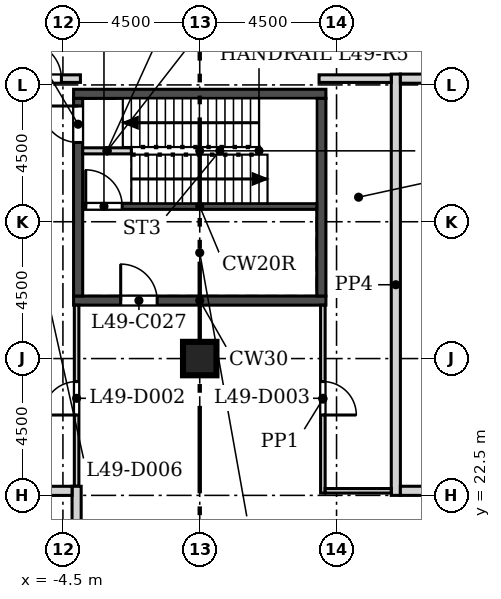
"""IFC4 building model, lengths in metres.
Left out: names, types, materials, properties, quantities, classifications, styles, units other than length and angle.
Written with IfcOpenShell. Run it as: python <this file> out.ifc"""

import sys

from ifc_helpers import new_model, si_unit, direction, frame, frame_2d, origin, origin_2d, place, context, subcontext, project, spatial, rectangle, extrude, element, fill, save


model = new_model("IFC4")
c1 = context("Model", 3, precision=1e-05, world=origin(), true_north=direction((0.0, 1.0)))
c2 = subcontext(c1, "Body", "Model", "MODEL_VIEW")
j1 = project(units=[si_unit("LENGTHUNIT", "METRE"), si_unit("PLANEANGLEUNIT", "RADIAN")], contexts=[c1])
p1 = place(None, origin())
s1 = spatial("IfcSite", under=j1, at=p1, CompositionType="ELEMENT")
p2 = place(p1, origin())
s2 = spatial("IfcBuilding", under=s1, at=p2, CompositionType="ELEMENT")
p3 = place(p2, frame((0.0, 0.0, 218.1)))
s3 = spatial("IfcBuildingStorey", under=s2, at=p3, CompositionType="ELEMENT", Elevation=218.1)
p4 = place(p3, frame((0.0, 27.0, 0.0), z_axis=(0.0, 0.0, 1.0), x_axis=(1.0, 0.0, 0.0)))
e1 = element("IfcColumn", 1, at=p4, inside=s3, PredefinedType="COLUMN", context=c2, shape_type="SweptSolid", body=[
    extrude(rectangle(XDim=1.1, YDim=1.1, at=origin_2d()), origin(), (0.0, 0.0, 1.0), 5.4),
])
p5 = place(p3, frame((27.139, 7.709, 0.0), z_axis=(0.0, 0.0, 1.0), x_axis=(-0.500000533701, 0.866025095652, 0.0)))
e2 = element("IfcWall", 2, at=p5, inside=s3, PredefinedType="SOLIDWALL", context=c2, shape_type="SweptSolid", body=[
    extrude(rectangle(XDim=45.573, YDim=0.34, at=frame_2d((22.787, 0.0))), origin(), (0.0, 0.0, 1.0), 5.0),
])
p6 = place(p5, frame((1.893, 0.0, 0.9)))
e3 = element("IfcOpeningElement", 3, at=p6, cuts=e2, PredefinedType="OPENING", context=c2, shape_type="SweptSolid", body=[
    extrude(rectangle(XDim=1.885, YDim=3.0, at=frame_2d((0.942, 1.5))), frame((0.0, 0.18, 0.0), z_axis=(0.0, -1.0, 0.0), x_axis=(1.0, 0.0, 0.0)), (0.0, 0.0, 1.0), 0.36),
])
p7 = place(p5, frame((4.893, 0.0, 0.9)))
e4 = element("IfcOpeningElement", 4, at=p7, cuts=e2, PredefinedType="OPENING", context=c2, shape_type="SweptSolid", body=[
    extrude(rectangle(XDim=1.885, YDim=3.0, at=frame_2d((0.942, 1.5))), frame((0.0, 0.18, 0.0), z_axis=(0.0, -1.0, 0.0), x_axis=(1.0, 0.0, 0.0)), (0.0, 0.0, 1.0), 0.36),
])
p8 = place(p5, frame((7.893, 0.0, 0.9)))
e5 = element("IfcOpeningElement", 5, at=p8, cuts=e2, PredefinedType="OPENING", context=c2, shape_type="SweptSolid", body=[
    extrude(rectangle(XDim=1.885, YDim=3.0, at=frame_2d((0.942, 1.5))), frame((0.0, 0.18, 0.0), z_axis=(0.0, -1.0, 0.0), x_axis=(1.0, 0.0, 0.0)), (0.0, 0.0, 1.0), 0.36),
])
p9 = place(p5, frame((10.893, 0.0, 0.9)))
e6 = element("IfcOpeningElement", 6, at=p9, cuts=e2, PredefinedType="OPENING", context=c2, shape_type="SweptSolid", body=[
    extrude(rectangle(XDim=1.885, YDim=3.0, at=frame_2d((0.942, 1.5))), frame((0.0, 0.18, 0.0), z_axis=(0.0, -1.0, 0.0), x_axis=(1.0, 0.0, 0.0)), (0.0, 0.0, 1.0), 0.36),
])
p10 = place(p5, frame((13.893, 0.0, 0.9)))
e7 = element("IfcOpeningElement", 7, at=p10, cuts=e2, PredefinedType="OPENING", context=c2, shape_type="SweptSolid", body=[
    extrude(rectangle(XDim=1.885, YDim=3.0, at=frame_2d((0.942, 1.5))), frame((0.0, 0.18, 0.0), z_axis=(0.0, -1.0, 0.0), x_axis=(1.0, 0.0, 0.0)), (0.0, 0.0, 1.0), 0.36),
])
p11 = place(p5, frame((16.893, 0.0, 0.9)))
e8 = element("IfcOpeningElement", 8, at=p11, cuts=e2, PredefinedType="OPENING", context=c2, shape_type="SweptSolid", body=[
    extrude(rectangle(XDim=1.885, YDim=3.0, at=frame_2d((0.942, 1.5))), frame((0.0, 0.18, 0.0), z_axis=(0.0, -1.0, 0.0), x_axis=(1.0, 0.0, 0.0)), (0.0, 0.0, 1.0), 0.36),
])
p12 = place(p5, frame((19.893, 0.0, 0.9)))
e9 = element("IfcOpeningElement", 9, at=p12, cuts=e2, PredefinedType="OPENING", context=c2, shape_type="SweptSolid", body=[
    extrude(rectangle(XDim=1.885, YDim=3.0, at=frame_2d((0.942, 1.5))), frame((0.0, 0.18, 0.0), z_axis=(0.0, -1.0, 0.0), x_axis=(1.0, 0.0, 0.0)), (0.0, 0.0, 1.0), 0.36),
])
p13 = place(p5, frame((22.893, 0.0, 0.9)))
e10 = element("IfcOpeningElement", 10, at=p13, cuts=e2, PredefinedType="OPENING", context=c2, shape_type="SweptSolid", body=[
    extrude(rectangle(XDim=1.885, YDim=3.0, at=frame_2d((0.942, 1.5))), frame((0.0, 0.18, 0.0), z_axis=(0.0, -1.0, 0.0), x_axis=(1.0, 0.0, 0.0)), (0.0, 0.0, 1.0), 0.36),
])
p14 = place(p5, frame((25.893, 0.0, 0.9)))
e11 = element("IfcOpeningElement", 11, at=p14, cuts=e2, PredefinedType="OPENING", context=c2, shape_type="SweptSolid", body=[
    extrude(rectangle(XDim=1.885, YDim=3.0, at=frame_2d((0.942, 1.5))), frame((0.0, 0.18, 0.0), z_axis=(0.0, -1.0, 0.0), x_axis=(1.0, 0.0, 0.0)), (0.0, 0.0, 1.0), 0.36),
])
p15 = place(p5, frame((28.893, 0.0, 0.9)))
e12 = element("IfcOpeningElement", 12, at=p15, cuts=e2, PredefinedType="OPENING", context=c2, shape_type="SweptSolid", body=[
    extrude(rectangle(XDim=1.885, YDim=3.0, at=frame_2d((0.942, 1.5))), frame((0.0, 0.18, 0.0), z_axis=(0.0, -1.0, 0.0), x_axis=(1.0, 0.0, 0.0)), (0.0, 0.0, 1.0), 0.36),
])
p16 = place(p5, frame((31.893, 0.0, 0.9)))
e13 = element("IfcOpeningElement", 13, at=p16, cuts=e2, PredefinedType="OPENING", context=c2, shape_type="SweptSolid", body=[
    extrude(rectangle(XDim=1.885, YDim=3.0, at=frame_2d((0.942, 1.5))), frame((0.0, 0.18, 0.0), z_axis=(0.0, -1.0, 0.0), x_axis=(1.0, 0.0, 0.0)), (0.0, 0.0, 1.0), 0.36),
])
p17 = place(p5, frame((34.893, 0.0, 0.9)))
e14 = element("IfcOpeningElement", 14, at=p17, cuts=e2, PredefinedType="OPENING", context=c2, shape_type="SweptSolid", body=[
    extrude(rectangle(XDim=1.885, YDim=3.0, at=frame_2d((0.942, 1.5))), frame((0.0, 0.18, 0.0), z_axis=(0.0, -1.0, 0.0), x_axis=(1.0, 0.0, 0.0)), (0.0, 0.0, 1.0), 0.36),
])
p18 = place(p5, frame((37.893, 0.0, 0.9)))
e15 = element("IfcOpeningElement", 15, at=p18, cuts=e2, PredefinedType="OPENING", context=c2, shape_type="SweptSolid", body=[
    extrude(rectangle(XDim=1.885, YDim=3.0, at=frame_2d((0.942, 1.5))), frame((0.0, 0.18, 0.0), z_axis=(0.0, -1.0, 0.0), x_axis=(1.0, 0.0, 0.0)), (0.0, 0.0, 1.0), 0.36),
])
p19 = place(p5, frame((40.893, 0.0, 0.9)))
e16 = element("IfcOpeningElement", 16, at=p19, cuts=e2, PredefinedType="OPENING", context=c2, shape_type="SweptSolid", body=[
    extrude(rectangle(XDim=1.885, YDim=3.0, at=frame_2d((0.942, 1.5))), frame((0.0, 0.18, 0.0), z_axis=(0.0, -1.0, 0.0), x_axis=(1.0, 0.0, 0.0)), (0.0, 0.0, 1.0), 0.36),
])
p20 = place(p3, frame((-4.353, 47.177, 0.0), z_axis=(0.0, 0.0, 1.0), x_axis=(-0.500000533701, -0.866025095652, 0.0)))
e17 = element("IfcWall", 17, at=p20, inside=s3, PredefinedType="SOLIDWALL", context=c2, shape_type="SweptSolid", body=[
    extrude(rectangle(XDim=45.573, YDim=0.34, at=frame_2d((22.787, 0.0))), origin(), (0.0, 0.0, 1.0), 5.0),
])
p21 = place(p20, frame((2.68, 0.0, 0.9)))
e18 = element("IfcOpeningElement", 18, at=p21, cuts=e17, PredefinedType="OPENING", context=c2, shape_type="SweptSolid", body=[
    extrude(rectangle(XDim=1.885, YDim=3.0, at=frame_2d((0.942, 1.5))), frame((0.0, 0.18, 0.0), z_axis=(0.0, -1.0, 0.0), x_axis=(1.0, 0.0, 0.0)), (0.0, 0.0, 1.0), 0.36),
])
p22 = place(p20, frame((5.68, 0.0, 0.9)))
e19 = element("IfcOpeningElement", 19, at=p22, cuts=e17, PredefinedType="OPENING", context=c2, shape_type="SweptSolid", body=[
    extrude(rectangle(XDim=1.885, YDim=3.0, at=frame_2d((0.942, 1.5))), frame((0.0, 0.18, 0.0), z_axis=(0.0, -1.0, 0.0), x_axis=(1.0, 0.0, 0.0)), (0.0, 0.0, 1.0), 0.36),
])
p23 = place(p20, frame((8.68, 0.0, 0.9)))
e20 = element("IfcOpeningElement", 20, at=p23, cuts=e17, PredefinedType="OPENING", context=c2, shape_type="SweptSolid", body=[
    extrude(rectangle(XDim=1.885, YDim=3.0, at=frame_2d((0.942, 1.5))), frame((0.0, 0.18, 0.0), z_axis=(0.0, -1.0, 0.0), x_axis=(1.0, 0.0, 0.0)), (0.0, 0.0, 1.0), 0.36),
])
p24 = place(p20, frame((11.68, 0.0, 0.9)))
e21 = element("IfcOpeningElement", 21, at=p24, cuts=e17, PredefinedType="OPENING", context=c2, shape_type="SweptSolid", body=[
    extrude(rectangle(XDim=1.885, YDim=3.0, at=frame_2d((0.942, 1.5))), frame((0.0, 0.18, 0.0), z_axis=(0.0, -1.0, 0.0), x_axis=(1.0, 0.0, 0.0)), (0.0, 0.0, 1.0), 0.36),
])
p25 = place(p20, frame((14.68, 0.0, 0.9)))
e22 = element("IfcOpeningElement", 22, at=p25, cuts=e17, PredefinedType="OPENING", context=c2, shape_type="SweptSolid", body=[
    extrude(rectangle(XDim=1.885, YDim=3.0, at=frame_2d((0.942, 1.5))), frame((0.0, 0.18, 0.0), z_axis=(0.0, -1.0, 0.0), x_axis=(1.0, 0.0, 0.0)), (0.0, 0.0, 1.0), 0.36),
])
p26 = place(p20, frame((17.68, 0.0, 0.9)))
e23 = element("IfcOpeningElement", 23, at=p26, cuts=e17, PredefinedType="OPENING", context=c2, shape_type="SweptSolid", body=[
    extrude(rectangle(XDim=1.885, YDim=3.0, at=frame_2d((0.942, 1.5))), frame((0.0, 0.18, 0.0), z_axis=(0.0, -1.0, 0.0), x_axis=(1.0, 0.0, 0.0)), (0.0, 0.0, 1.0), 0.36),
])
p27 = place(p20, frame((20.68, 0.0, 0.9)))
e24 = element("IfcOpeningElement", 24, at=p27, cuts=e17, PredefinedType="OPENING", context=c2, shape_type="SweptSolid", body=[
    extrude(rectangle(XDim=1.885, YDim=3.0, at=frame_2d((0.942, 1.5))), frame((0.0, 0.18, 0.0), z_axis=(0.0, -1.0, 0.0), x_axis=(1.0, 0.0, 0.0)), (0.0, 0.0, 1.0), 0.36),
])
p28 = place(p20, frame((23.68, 0.0, 0.9)))
e25 = element("IfcOpeningElement", 25, at=p28, cuts=e17, PredefinedType="OPENING", context=c2, shape_type="SweptSolid", body=[
    extrude(rectangle(XDim=1.885, YDim=3.0, at=frame_2d((0.942, 1.5))), frame((0.0, 0.18, 0.0), z_axis=(0.0, -1.0, 0.0), x_axis=(1.0, 0.0, 0.0)), (0.0, 0.0, 1.0), 0.36),
])
p29 = place(p20, frame((26.68, 0.0, 0.9)))
e26 = element("IfcOpeningElement", 26, at=p29, cuts=e17, PredefinedType="OPENING", context=c2, shape_type="SweptSolid", body=[
    extrude(rectangle(XDim=1.885, YDim=3.0, at=frame_2d((0.942, 1.5))), frame((0.0, 0.18, 0.0), z_axis=(0.0, -1.0, 0.0), x_axis=(1.0, 0.0, 0.0)), (0.0, 0.0, 1.0), 0.36),
])
p30 = place(p20, frame((29.68, 0.0, 0.9)))
e27 = element("IfcOpeningElement", 27, at=p30, cuts=e17, PredefinedType="OPENING", context=c2, shape_type="SweptSolid", body=[
    extrude(rectangle(XDim=1.885, YDim=3.0, at=frame_2d((0.942, 1.5))), frame((0.0, 0.18, 0.0), z_axis=(0.0, -1.0, 0.0), x_axis=(1.0, 0.0, 0.0)), (0.0, 0.0, 1.0), 0.36),
])
p31 = place(p20, frame((32.68, 0.0, 0.9)))
e28 = element("IfcOpeningElement", 28, at=p31, cuts=e17, PredefinedType="OPENING", context=c2, shape_type="SweptSolid", body=[
    extrude(rectangle(XDim=1.885, YDim=3.0, at=frame_2d((0.942, 1.5))), frame((0.0, 0.18, 0.0), z_axis=(0.0, -1.0, 0.0), x_axis=(1.0, 0.0, 0.0)), (0.0, 0.0, 1.0), 0.36),
])
p32 = place(p20, frame((35.68, 0.0, 0.9)))
e29 = element("IfcOpeningElement", 29, at=p32, cuts=e17, PredefinedType="OPENING", context=c2, shape_type="SweptSolid", body=[
    extrude(rectangle(XDim=1.885, YDim=3.0, at=frame_2d((0.942, 1.5))), frame((0.0, 0.18, 0.0), z_axis=(0.0, -1.0, 0.0), x_axis=(1.0, 0.0, 0.0)), (0.0, 0.0, 1.0), 0.36),
])
p33 = place(p20, frame((38.68, 0.0, 0.9)))
e30 = element("IfcOpeningElement", 30, at=p33, cuts=e17, PredefinedType="OPENING", context=c2, shape_type="SweptSolid", body=[
    extrude(rectangle(XDim=1.885, YDim=3.0, at=frame_2d((0.942, 1.5))), frame((0.0, 0.18, 0.0), z_axis=(0.0, -1.0, 0.0), x_axis=(1.0, 0.0, 0.0)), (0.0, 0.0, 1.0), 0.36),
])
p34 = place(p20, frame((41.68, 0.0, 0.9)))
e31 = element("IfcOpeningElement", 31, at=p34, cuts=e17, PredefinedType="OPENING", context=c2, shape_type="SweptSolid", body=[
    extrude(rectangle(XDim=1.885, YDim=3.0, at=frame_2d((0.942, 1.5))), frame((0.0, 0.18, 0.0), z_axis=(0.0, -1.0, 0.0), x_axis=(1.0, 0.0, 0.0)), (0.0, 0.0, 1.0), 0.36),
])
p35 = place(p3, frame((-4.15, 28.907, -0.4), z_axis=(0.0, 0.0, 1.0), x_axis=(1.0, 0.0, 0.0)))
e32 = element("IfcWall", 32, at=p35, inside=s3, PredefinedType="SOLIDWALL", context=c2, shape_type="SweptSolid", body=[
    extrude(rectangle(XDim=8.3, YDim=0.3, at=frame_2d((4.15, 0.0))), origin(), (0.0, 0.0, 1.0), 5.4),
])
p36 = place(p35, frame((1.55, 0.0, 0.4)))
e33 = element("IfcOpeningElement", 33, at=p36, cuts=e32, PredefinedType="OPENING", context=c2, shape_type="SweptSolid", body=[
    extrude(rectangle(XDim=1.2, YDim=2.1, at=frame_2d((0.6, 1.05))), frame((0.0, 0.16, 0.0), z_axis=(0.0, -1.0, 0.0), x_axis=(1.0, 0.0, 0.0)), (0.0, 0.0, 1.0), 0.32),
])
p37 = place(p3, frame((-4.15, 35.707, -0.4), z_axis=(0.0, 0.0, 1.0), x_axis=(1.0, 0.0, 0.0)))
e34 = element("IfcWall", 34, at=p37, inside=s3, PredefinedType="SOLIDWALL", context=c2, shape_type="SweptSolid", body=[
    extrude(rectangle(XDim=8.3, YDim=0.3, at=frame_2d((4.15, 0.0))), origin(), (0.0, 0.0, 1.0), 5.4),
])
p38 = place(p3, frame((-4.0, 29.057, -0.4), z_axis=(0.0, 0.0, 1.0), x_axis=(0.0, 1.0, 0.0)))
e35 = element("IfcWall", 35, at=p38, inside=s3, PredefinedType="SOLIDWALL", context=c2, shape_type="SweptSolid", body=[
    extrude(rectangle(XDim=6.5, YDim=0.3, at=frame_2d((3.25, 0.0))), origin(), (0.0, 0.0, 1.0), 5.4),
])
p39 = place(p38, frame((5.05, 0.0, 0.4)))
e36 = element("IfcOpeningElement", 36, at=p39, cuts=e35, PredefinedType="OPENING", context=c2, shape_type="SweptSolid", body=[
    extrude(rectangle(XDim=1.2, YDim=2.1, at=frame_2d((0.6, 1.05))), frame((0.0, 0.16, 0.0), z_axis=(0.0, -1.0, 0.0), x_axis=(1.0, 0.0, 0.0)), (0.0, 0.0, 1.0), 0.32),
])
p40 = place(p3, frame((4.0, 29.057, -0.4), z_axis=(0.0, 0.0, 1.0), x_axis=(0.0, 1.0, 0.0)))
e37 = element("IfcWall", 37, at=p40, inside=s3, PredefinedType="SOLIDWALL", context=c2, shape_type="SweptSolid", body=[
    extrude(rectangle(XDim=6.5, YDim=0.3, at=frame_2d((3.25, 0.0))), origin(), (0.0, 0.0, 1.0), 5.4),
])
p41 = place(p3, frame((-3.85, 32.007, -0.4), z_axis=(0.0, 0.0, 1.0), x_axis=(1.0, 0.0, 0.0)))
e38 = element("IfcWall", 38, at=p41, inside=s3, PredefinedType="SOLIDWALL", context=c2, shape_type="SweptSolid", body=[
    extrude(rectangle(XDim=7.7, YDim=0.2, at=frame_2d((3.85, 0.0))), origin(), (0.0, 0.0, 1.0), 5.4),
])
p42 = place(p41, frame((0.1, 0.0, 0.4)))
e39 = element("IfcOpeningElement", 39, at=p42, cuts=e38, PredefinedType="OPENING", context=c2, shape_type="SweptSolid", body=[
    extrude(rectangle(XDim=1.2, YDim=2.1, at=frame_2d((0.6, 1.05))), frame((0.0, 0.11, 0.0), z_axis=(0.0, -1.0, 0.0), x_axis=(1.0, 0.0, 0.0)), (0.0, 0.0, 1.0), 0.22),
])
p43 = place(p3, frame((-3.85, 33.832, 0.0), z_axis=(0.0, 0.0, 1.0), x_axis=(1.0, 0.0, 0.0)))
e40 = element("IfcWall", 40, at=p43, inside=s3, PredefinedType="SOLIDWALL", context=c2, shape_type="SweptSolid", body=[
    extrude(rectangle(XDim=1.6, YDim=0.2, at=frame_2d((0.8, 0.0))), origin(), (0.0, 0.0, 1.0), 5.0),
])
p44 = place(p3, frame((6.45, 36.356, 0.0), z_axis=(0.0, 0.0, 1.0), x_axis=(0.0, -1.0, 0.0)))
e41 = element("IfcWall", 41, at=p44, inside=s3, PredefinedType="SOLIDWALL", context=c2, shape_type="SweptSolid", body=[
    extrude(rectangle(XDim=13.856, YDim=0.3, at=frame_2d((6.928, 0.0))), origin(), (0.0, 0.0, 1.0), 5.0),
])
p45 = place(p3, frame((4.05, 28.757, 0.0), z_axis=(0.0, 0.0, 1.0), x_axis=(0.0, -1.0, 0.0)))
e42 = element("IfcWall", 42, at=p45, inside=s3, PredefinedType="PARTITIONING", context=c2, shape_type="SweptSolid", body=[
    extrude(rectangle(XDim=6.182, YDim=0.15, at=frame_2d((3.091, 0.0))), origin(), (0.0, 0.0, 1.0), 5.0),
])
p46 = place(p45, frame((2.513, 0.0, 0.0)))
e43 = element("IfcOpeningElement", 43, at=p46, cuts=e42, PredefinedType="OPENING", context=c2, shape_type="SweptSolid", body=[
    extrude(rectangle(XDim=1.1, YDim=2.1, at=frame_2d((0.55, 1.05))), frame((0.0, 0.085, 0.0), z_axis=(0.0, -1.0, 0.0), x_axis=(1.0, 0.0, 0.0)), (0.0, 0.0, 1.0), 0.17),
])
p47 = place(p3, frame((-4.05, 22.799, 0.0), z_axis=(0.0, 0.0, 1.0), x_axis=(0.0, 1.0, 0.0)))
e44 = element("IfcWall", 44, at=p47, inside=s3, PredefinedType="PARTITIONING", context=c2, shape_type="SweptSolid", body=[
    extrude(rectangle(XDim=5.958, YDim=0.15, at=frame_2d((2.979, 0.0))), origin(), (0.0, 0.0, 1.0), 5.0),
])
p48 = place(p47, frame((2.344, 0.0, 0.0)))
e45 = element("IfcOpeningElement", 45, at=p48, cuts=e44, PredefinedType="OPENING", context=c2, shape_type="SweptSolid", body=[
    extrude(rectangle(XDim=1.1, YDim=2.1, at=frame_2d((0.55, 1.05))), frame((0.0, 0.085, 0.0), z_axis=(0.0, -1.0, 0.0), x_axis=(1.0, 0.0, 0.0)), (0.0, 0.0, 1.0), 0.17),
])
p49 = place(p3, frame((6.6, 22.65, 0.0), z_axis=(0.0, 0.0, 1.0), x_axis=(1.0, 0.0, 0.0)))
e46 = element("IfcWall", 46, at=p49, inside=s3, PredefinedType="SOLIDWALL", context=c2, shape_type="SweptSolid", body=[
    extrude(rectangle(XDim=5.067, YDim=0.3, at=frame_2d((2.534, 0.0))), origin(), (0.0, 0.0, 1.0), 5.0),
])
p50 = place(p3, frame((10.404, 36.206, 0.0), z_axis=(0.0, 0.0, 1.0), x_axis=(-1.0, 0.0, 0.0)))
e47 = element("IfcWall", 47, at=p50, inside=s3, PredefinedType="SOLIDWALL", context=c2, shape_type="SweptSolid", body=[
    extrude(rectangle(XDim=3.804, YDim=0.3, at=frame_2d((1.902, 0.0))), origin(), (0.0, 0.0, 1.0), 5.0),
])
p51 = place(p3, frame((3.925, 36.207, 0.0), z_axis=(0.0, 0.0, 1.0), x_axis=(1.0, 0.0, 0.0)))
e48 = element("IfcWall", 48, at=p51, inside=s3, PredefinedType="SOLIDWALL", context=c2, shape_type="SweptSolid", body=[
    extrude(rectangle(XDim=2.375, YDim=0.25, at=frame_2d((1.188, 0.0))), origin(), (0.0, 0.0, 1.0), 5.0),
])
p52 = place(p3, frame((-4.05, 20.5, 0.0), z_axis=(0.0, 0.0, 1.0), x_axis=(0.0, 1.0, 0.0)))
e49 = element("IfcWall", 49, at=p52, inside=s3, PredefinedType="SOLIDWALL", context=c2, shape_type="SweptSolid", body=[
    extrude(rectangle(XDim=2.299, YDim=0.3, at=frame_2d((1.149, 0.0))), origin(), (0.0, 0.0, 1.0), 5.0),
])
p53 = place(p3, frame((-6.125, 36.207, 0.0), z_axis=(0.0, 0.0, 1.0), x_axis=(1.0, 0.0, 0.0)))
e50 = element("IfcWall", 50, at=p53, inside=s3, PredefinedType="SOLIDWALL", context=c2, shape_type="SweptSolid", body=[
    extrude(rectangle(XDim=2.2, YDim=0.25, at=frame_2d((1.1, 0.0))), origin(), (0.0, 0.0, 1.0), 5.0),
])
p54 = place(p53, frame((0.375, 0.0, 0.0)))
e51 = element("IfcOpeningElement", 51, at=p54, cuts=e50, PredefinedType="OPENING", context=c2, shape_type="SweptSolid", body=[
    extrude(rectangle(XDim=1.2, YDim=2.1, at=frame_2d((0.6, 1.05))), frame((0.0, 0.135, 0.0), z_axis=(0.0, -1.0, 0.0), x_axis=(1.0, 0.0, 0.0)), (0.0, 0.0, 1.0), 0.27),
])
p55 = place(p3, frame((4.125, 22.65, 0.0), z_axis=(0.0, 0.0, 1.0), x_axis=(1.0, 0.0, 0.0)))
e52 = element("IfcWall", 52, at=p55, inside=s3, PredefinedType="PARTITIONING", context=c2, shape_type="SweptSolid", body=[
    extrude(rectangle(XDim=2.175, YDim=0.15, at=frame_2d((1.087, 0.0))), origin(), (0.0, 0.0, 1.0), 5.0),
])
p56 = place(p3, frame((-4.2, 22.649, 0.0), z_axis=(0.0, 0.0, 1.0), x_axis=(-1.0, 0.0, 0.0)))
e53 = element("IfcWall", 53, at=p56, inside=s3, PredefinedType="SOLIDWALL", context=c2, shape_type="SweptSolid", body=[
    extrude(rectangle(XDim=1.9, YDim=0.3, at=frame_2d((0.95, 0.0))), origin(), (0.0, 0.0, 1.0), 5.0),
])
p57 = place(p36, origin())
e54 = element("IfcDoor", 54, at=p57, inside=s3, OperationType="SINGLE_SWING_LEFT", PredefinedType="DOOR", context=c2, shape_type="SweptSolid", body=[
    extrude(rectangle(XDim=1.2, YDim=2.1, at=frame_2d((0.6, 1.05))), frame((0.0, 0.025, 0.0), z_axis=(0.0, -1.0, 0.0), x_axis=(1.0, 0.0, 0.0)), (0.0, 0.0, 1.0), 0.05),
])
fill(e33, e54)
p58 = place(p42, origin())
e55 = element("IfcDoor", 55, at=p58, inside=s3, OperationType="SINGLE_SWING_LEFT", PredefinedType="DOOR", context=c2, shape_type="SweptSolid", body=[
    extrude(rectangle(XDim=1.2, YDim=2.1, at=frame_2d((0.6, 1.05))), frame((0.0, 0.025, 0.0), z_axis=(0.0, -1.0, 0.0), x_axis=(1.0, 0.0, 0.0)), (0.0, 0.0, 1.0), 0.05),
])
fill(e39, e55)
p59 = place(p39, origin())
e56 = element("IfcDoor", 56, at=p59, inside=s3, OperationType="SINGLE_SWING_RIGHT", PredefinedType="DOOR", context=c2, shape_type="SweptSolid", body=[
    extrude(rectangle(XDim=1.2, YDim=2.1, at=frame_2d((0.6, 1.05))), frame((0.0, 0.025, 0.0), z_axis=(0.0, -1.0, 0.0), x_axis=(1.0, 0.0, 0.0)), (0.0, 0.0, 1.0), 0.05),
])
fill(e36, e56)
p60 = place(p48, origin())
e57 = element("IfcDoor", 57, at=p60, inside=s3, OperationType="SINGLE_SWING_LEFT", PredefinedType="DOOR", context=c2, shape_type="SweptSolid", body=[
    extrude(rectangle(XDim=1.1, YDim=2.1, at=frame_2d((0.55, 1.05))), frame((0.0, 0.025, 0.0), z_axis=(0.0, -1.0, 0.0), x_axis=(1.0, 0.0, 0.0)), (0.0, 0.0, 1.0), 0.05),
])
fill(e45, e57)
p61 = place(p46, origin())
e58 = element("IfcDoor", 58, at=p61, inside=s3, OperationType="SINGLE_SWING_RIGHT", PredefinedType="DOOR", context=c2, shape_type="SweptSolid", body=[
    extrude(rectangle(XDim=1.1, YDim=2.1, at=frame_2d((0.55, 1.05))), frame((0.0, 0.025, 0.0), z_axis=(0.0, -1.0, 0.0), x_axis=(1.0, 0.0, 0.0)), (0.0, 0.0, 1.0), 0.05),
])
fill(e43, e58)
p62 = place(p54, origin())
e59 = element("IfcDoor", 59, at=p62, inside=s3, OperationType="SINGLE_SWING_LEFT", PredefinedType="DOOR", context=c2, shape_type="SweptSolid", body=[
    extrude(rectangle(XDim=1.2, YDim=2.1, at=frame_2d((0.6, 1.05))), frame((0.0, 0.025, 0.0), z_axis=(0.0, -1.0, 0.0), x_axis=(1.0, 0.0, 0.0)), (0.0, 0.0, 1.0), 0.05),
])
fill(e51, e59)
save(model, sys.argv[1])
